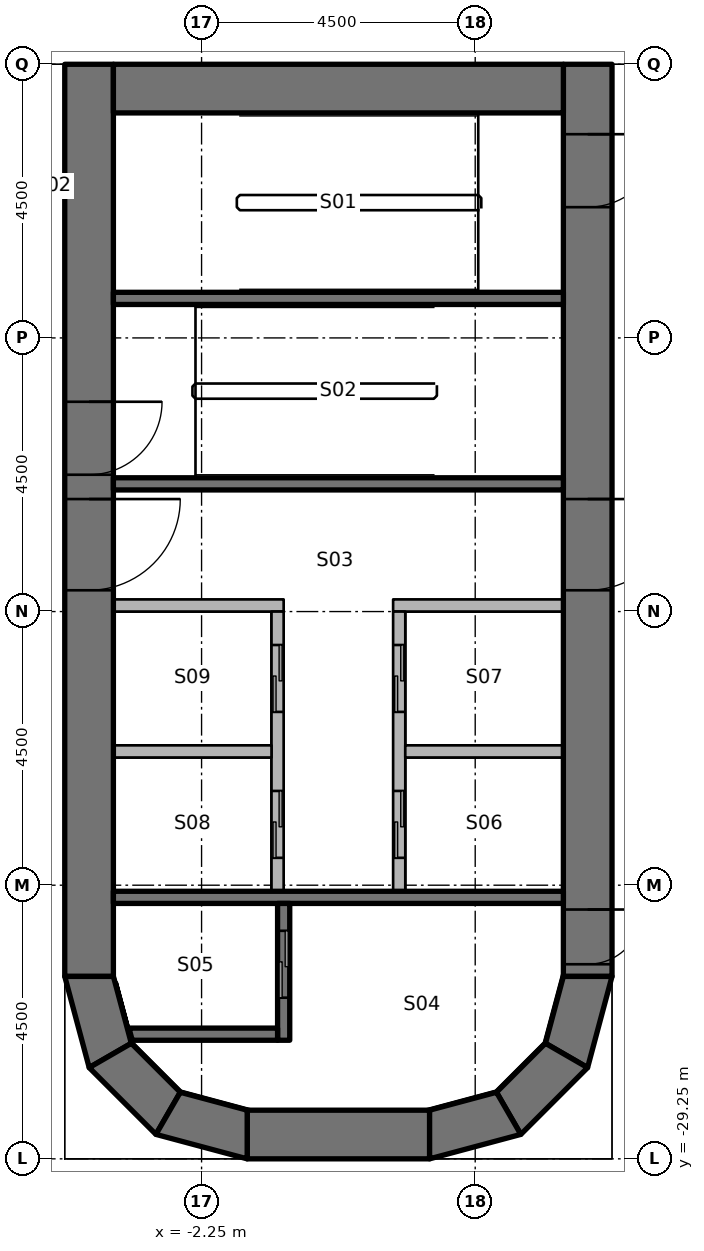
"""IFC4 building model, lengths in metres.
Left out: names, types, materials, properties, quantities, classifications, styles, units other than length and angle.
Written with IfcOpenShell. Run it as: python <this file> out.ifc"""

import sys

from ifc_helpers import new_model, si_unit, direction, frame, frame_2d, origin, place, context, subcontext, project, spatial, polyline, rectangle, outline, extrude, element, fill, save


model = new_model("IFC4")
c1 = context("Model", 3, precision=1e-05, world=origin(), true_north=direction((0.0, 1.0)))
c2 = subcontext(c1, "Body", "Model", "MODEL_VIEW")
j1 = project(units=[si_unit("LENGTHUNIT", "METRE"), si_unit("PLANEANGLEUNIT", "RADIAN")], contexts=[c1])
p1 = place(None, origin())
s1 = spatial("IfcSite", under=j1, at=p1, CompositionType="ELEMENT")
p2 = place(p1, origin())
s2 = spatial("IfcBuilding", under=s1, at=p2, CompositionType="ELEMENT")
p3 = place(p2, frame((0.0, 0.0, 136.0)))
s3 = spatial("IfcBuildingStorey", under=s2, at=p3, CompositionType="ELEMENT", Elevation=136.0)
p4 = place(p3, frame((-4.1, -11.25, 0.0), z_axis=(0.0, 0.0, 1.0), x_axis=(0.0, -1.0, 0.0)))
e1 = element("IfcWall", 1, at=p4, inside=s3, PredefinedType="SHEAR", context=c2, shape_type="SweptSolid", body=[
    extrude(rectangle(XDim=15.0, YDim=0.8, at=frame_2d((7.5, 0.0))), origin(), (0.0, 0.0, 1.0), 5.0),
])
p5 = place(p4, frame((7.15, 0.0, 0.0)))
e2 = element("IfcOpeningElement", 2, at=p5, cuts=e1, PredefinedType="OPENING", context=c2, shape_type="SweptSolid", body=[
    extrude(rectangle(XDim=1.5, YDim=2.3, at=frame_2d((0.75, 1.15))), frame((0.0, 0.41, 0.0), z_axis=(0.0, -1.0, 0.0), x_axis=(1.0, 0.0, 0.0)), (0.0, 0.0, 1.0), 0.82),
])
p6 = place(p4, frame((5.55, 0.0, 0.0)))
e3 = element("IfcOpeningElement", 3, at=p6, cuts=e1, PredefinedType="OPENING", context=c2, shape_type="SweptSolid", body=[
    extrude(rectangle(XDim=1.2, YDim=2.1, at=frame_2d((0.6, 1.05))), frame((0.0, 0.41, 0.0), z_axis=(0.0, -1.0, 0.0), x_axis=(1.0, 0.0, 0.0)), (0.0, 0.0, 1.0), 0.82),
])
p7 = place(p3, frame((4.1, -11.25, 0.0), z_axis=(0.0, 0.0, 1.0), x_axis=(0.0, -1.0, 0.0)))
e4 = element("IfcWall", 4, at=p7, inside=s3, PredefinedType="SHEAR", context=c2, shape_type="SweptSolid", body=[
    extrude(rectangle(XDim=15.0, YDim=0.8, at=frame_2d((7.5, 0.0))), origin(), (0.0, 0.0, 1.0), 5.0),
])
p8 = place(p7, frame((7.15, 0.0, 0.0)))
e5 = element("IfcOpeningElement", 5, at=p8, cuts=e4, PredefinedType="OPENING", context=c2, shape_type="SweptSolid", body=[
    extrude(rectangle(XDim=1.5, YDim=2.3, at=frame_2d((0.75, 1.15))), frame((0.0, 0.41, 0.0), z_axis=(0.0, -1.0, 0.0), x_axis=(1.0, 0.0, 0.0)), (0.0, 0.0, 1.0), 0.82),
])
p9 = place(p7, frame((13.9, 0.0, 0.0)))
e6 = element("IfcOpeningElement", 6, at=p9, cuts=e4, PredefinedType="OPENING", context=c2, shape_type="SweptSolid", body=[
    extrude(rectangle(XDim=0.9, YDim=2.1, at=frame_2d((0.45, 1.05))), frame((0.0, 0.41, 0.0), z_axis=(0.0, -1.0, 0.0), x_axis=(1.0, 0.0, 0.0)), (0.0, 0.0, 1.0), 0.82),
])
p10 = place(p7, frame((1.15, 0.0, 0.0)))
e7 = element("IfcOpeningElement", 7, at=p10, cuts=e4, PredefinedType="OPENING", context=c2, shape_type="SweptSolid", body=[
    extrude(rectangle(XDim=1.2, YDim=2.1, at=frame_2d((0.6, 1.05))), frame((0.0, 0.41, 0.0), z_axis=(0.0, -1.0, 0.0), x_axis=(1.0, 0.0, 0.0)), (0.0, 0.0, 1.0), 0.82),
])
p11 = place(p3, frame((-3.7, -11.65, 0.0), z_axis=(0.0, 0.0, 1.0), x_axis=(1.0, 0.0, 0.0)))
e8 = element("IfcWall", 8, at=p11, inside=s3, PredefinedType="SHEAR", context=c2, shape_type="SweptSolid", body=[
    extrude(rectangle(XDim=7.4, YDim=0.8, at=frame_2d((3.7, 0.0))), origin(), (0.0, 0.0, 1.0), 5.0),
])
p12 = place(p3, frame((-1.5, -28.85, 0.0), z_axis=(0.0, 0.0, 1.0), x_axis=(1.0, 0.0, 0.0)))
e9 = element("IfcWall", 9, at=p12, inside=s3, PredefinedType="SHEAR", context=c2, shape_type="SweptSolid", body=[
    extrude(rectangle(XDim=3.0, YDim=0.8, at=frame_2d((1.5, 0.0))), origin(), (0.0, 0.0, 1.0), 5.0),
])
p13 = place(p3, origin())
e10 = element("IfcWall", 10, at=p13, inside=s3, PredefinedType="SHEAR", context=c2, shape_type="SweptSolid", body=[
    extrude(outline(polyline([(-4.5, -26.25), (-4.098, -27.75), (-3.405, -27.35), (-3.7, -26.25), (-4.5, -26.25)])), origin(), (0.0, 0.0, 1.0), 5.0),
])
p14 = place(p3, origin())
e11 = element("IfcWall", 11, at=p14, inside=s3, PredefinedType="SHEAR", context=c2, shape_type="SweptSolid", body=[
    extrude(outline(polyline([(-4.098, -27.75), (-3.0, -28.848), (-2.6, -28.155), (-3.405, -27.35), (-4.098, -27.75)])), origin(), (0.0, 0.0, 1.0), 5.0),
])
p15 = place(p3, origin())
e12 = element("IfcWall", 12, at=p15, inside=s3, PredefinedType="SHEAR", context=c2, shape_type="SweptSolid", body=[
    extrude(outline(polyline([(-3.0, -28.848), (-1.5, -29.25), (-1.5, -28.45), (-2.6, -28.155), (-3.0, -28.848)])), origin(), (0.0, 0.0, 1.0), 5.0),
])
p16 = place(p3, origin())
e13 = element("IfcWall", 13, at=p16, inside=s3, PredefinedType="SHEAR", context=c2, shape_type="SweptSolid", body=[
    extrude(outline(polyline([(4.5, -26.25), (4.098, -27.75), (3.405, -27.35), (3.7, -26.25), (4.5, -26.25)])), origin(), (0.0, 0.0, 1.0), 5.0),
])
p17 = place(p3, origin())
e14 = element("IfcWall", 14, at=p17, inside=s3, PredefinedType="SHEAR", context=c2, shape_type="SweptSolid", body=[
    extrude(outline(polyline([(4.098, -27.75), (3.0, -28.848), (2.6, -28.155), (3.405, -27.35), (4.098, -27.75)])), origin(), (0.0, 0.0, 1.0), 5.0),
])
p18 = place(p3, origin())
e15 = element("IfcWall", 15, at=p18, inside=s3, PredefinedType="SHEAR", context=c2, shape_type="SweptSolid", body=[
    extrude(outline(polyline([(3.0, -28.848), (1.5, -29.25), (1.5, -28.45), (2.6, -28.155), (3.0, -28.848)])), origin(), (0.0, 0.0, 1.0), 5.0),
])
p19 = place(p3, frame((3.7, -24.95, 0.0), z_axis=(0.0, 0.0, 1.0), x_axis=(-1.0, 0.0, 0.0)))
e16 = element("IfcWall", 16, at=p19, inside=s3, PredefinedType="SHEAR", context=c2, shape_type="SweptSolid", body=[
    extrude(rectangle(XDim=7.4, YDim=0.2, at=frame_2d((3.7, 0.0))), origin(), (0.0, 0.0, 1.0), 4.85),
])
p20 = place(p3, frame((-0.9, -27.3, 0.0), z_axis=(0.0, 0.0, 1.0), x_axis=(0.0, 1.0, 0.0)))
e17 = element("IfcWall", 17, at=p20, inside=s3, PredefinedType="SHEAR", context=c2, shape_type="SweptSolid", body=[
    extrude(rectangle(XDim=2.25, YDim=0.2, at=frame_2d((1.125, 0.0))), origin(), (0.0, 0.0, 1.0), 4.85),
])
p21 = place(p20, frame((0.7, 0.0, 0.0)))
e18 = element("IfcOpeningElement", 18, at=p21, cuts=e17, PredefinedType="OPENING", context=c2, shape_type="SweptSolid", body=[
    extrude(rectangle(XDim=1.1, YDim=2.3, at=frame_2d((0.55, 1.15))), frame((0.0, 0.11, 0.0), z_axis=(0.0, -1.0, 0.0), x_axis=(1.0, 0.0, 0.0)), (0.0, 0.0, 1.0), 0.22),
])
p22 = place(p3, origin())
e19 = element("IfcWall", 19, at=p22, inside=s3, PredefinedType="SHEAR", context=c2, shape_type="SweptSolid", body=[
    extrude(outline(polyline([(-1.0, -27.1), (-3.444, -27.1), (-3.39, -27.3), (-1.0, -27.3), (-1.0, -27.1)])), origin(), (0.0, 0.0, 1.0), 4.85),
])
for number, where, z_axis, x_axis in (
    (20, (3.7, -18.15, 0.0), (0.0, 0.0, 1.0), (-1.0, 0.0, 0.0)),
    (21, (3.7, -15.1, 0.0), (0.0, 0.0, 1.0), (-1.0, 0.0, 0.0)),
):
    element("IfcWall", number, at=place(p3, frame(where, z_axis=z_axis, x_axis=x_axis)), inside=s3, PredefinedType="SHEAR", context=c2, shape_type="SweptSolid", body=[
        extrude(rectangle(XDim=7.4, YDim=0.2, at=frame_2d((3.7, 0.0))), origin(), (0.0, 0.0, 1.0), 4.85),
    ])
p23 = place(p3, frame((3.7, -20.15, 0.0), z_axis=(0.0, 0.0, 1.0), x_axis=(-1.0, 0.0, 0.0)))
e22 = element("IfcWall", 22, at=p23, inside=s3, PredefinedType="PARTITIONING", context=c2, shape_type="SweptSolid", body=[
    extrude(rectangle(XDim=2.8, YDim=0.2, at=frame_2d((1.4, 0.0))), origin(), (0.0, 0.0, 1.0), 4.85),
])
p24 = place(p3, frame((1.0, -24.85, 0.0), z_axis=(0.0, 0.0, 1.0), x_axis=(0.0, 1.0, 0.0)))
e23 = element("IfcWall", 23, at=p24, inside=s3, PredefinedType="PARTITIONING", context=c2, shape_type="SweptSolid", body=[
    extrude(rectangle(XDim=4.6, YDim=0.2, at=frame_2d((2.3, 0.0))), origin(), (0.0, 0.0, 1.0), 4.85),
])
p25 = place(p24, frame((0.55, 0.0, 0.0)))
e24 = element("IfcOpeningElement", 24, at=p25, cuts=e23, PredefinedType="OPENING", context=c2, shape_type="SweptSolid", body=[
    extrude(rectangle(XDim=1.1, YDim=2.3, at=frame_2d((0.55, 1.15))), frame((0.0, 0.11, 0.0), z_axis=(0.0, -1.0, 0.0), x_axis=(1.0, 0.0, 0.0)), (0.0, 0.0, 1.0), 0.22),
])
p26 = place(p24, frame((2.95, 0.0, 0.0)))
e25 = element("IfcOpeningElement", 25, at=p26, cuts=e23, PredefinedType="OPENING", context=c2, shape_type="SweptSolid", body=[
    extrude(rectangle(XDim=1.1, YDim=2.3, at=frame_2d((0.55, 1.15))), frame((0.0, 0.11, 0.0), z_axis=(0.0, -1.0, 0.0), x_axis=(1.0, 0.0, 0.0)), (0.0, 0.0, 1.0), 0.22),
])
p27 = place(p3, frame((-0.9, -20.15, 0.0), z_axis=(0.0, 0.0, 1.0), x_axis=(-1.0, 0.0, 0.0)))
e26 = element("IfcWall", 26, at=p27, inside=s3, PredefinedType="PARTITIONING", context=c2, shape_type="SweptSolid", body=[
    extrude(rectangle(XDim=2.8, YDim=0.2, at=frame_2d((1.4, 0.0))), origin(), (0.0, 0.0, 1.0), 4.85),
])
p28 = place(p3, frame((-1.0, -24.85, 0.0), z_axis=(0.0, 0.0, 1.0), x_axis=(0.0, 1.0, 0.0)))
e27 = element("IfcWall", 27, at=p28, inside=s3, PredefinedType="PARTITIONING", context=c2, shape_type="SweptSolid", body=[
    extrude(rectangle(XDim=4.6, YDim=0.2, at=frame_2d((2.3, 0.0))), origin(), (0.0, 0.0, 1.0), 4.85),
])
p29 = place(p28, frame((0.55, 0.0, 0.0)))
e28 = element("IfcOpeningElement", 28, at=p29, cuts=e27, PredefinedType="OPENING", context=c2, shape_type="SweptSolid", body=[
    extrude(rectangle(XDim=1.1, YDim=2.3, at=frame_2d((0.55, 1.15))), frame((0.0, 0.11, 0.0), z_axis=(0.0, -1.0, 0.0), x_axis=(1.0, 0.0, 0.0)), (0.0, 0.0, 1.0), 0.22),
])
p30 = place(p28, frame((2.95, 0.0, 0.0)))
e29 = element("IfcOpeningElement", 29, at=p30, cuts=e27, PredefinedType="OPENING", context=c2, shape_type="SweptSolid", body=[
    extrude(rectangle(XDim=1.1, YDim=2.3, at=frame_2d((0.55, 1.15))), frame((0.0, 0.11, 0.0), z_axis=(0.0, -1.0, 0.0), x_axis=(1.0, 0.0, 0.0)), (0.0, 0.0, 1.0), 0.22),
])
for number, where, z_axis, x_axis in (
    (30, (3.7, -22.55, 0.0), (0.0, 0.0, 1.0), (-1.0, 0.0, 0.0)),
    (31, (-1.1, -22.55, 0.0), (0.0, 0.0, 1.0), (-1.0, 0.0, 0.0)),
):
    element("IfcWall", number, at=place(p3, frame(where, z_axis=z_axis, x_axis=x_axis)), inside=s3, PredefinedType="PARTITIONING", context=c2, shape_type="SweptSolid", body=[
        extrude(rectangle(XDim=2.6, YDim=0.2, at=frame_2d((1.3, 0.0))), origin(), (0.0, 0.0, 1.0), 4.85),
    ])
p31 = place(p8, origin())
e32 = element("IfcDoor", 32, at=p31, inside=s3, OperationType="DOUBLE_DOOR_SINGLE_SWING", PredefinedType="DOOR", context=c2, shape_type="SweptSolid", body=[
    extrude(rectangle(XDim=1.5, YDim=2.3, at=frame_2d((0.75, 1.15))), frame((0.0, 0.025, 0.0), z_axis=(0.0, -1.0, 0.0), x_axis=(1.0, 0.0, 0.0)), (0.0, 0.0, 1.0), 0.05),
])
fill(e5, e32)
p32 = place(p5, origin())
e33 = element("IfcDoor", 33, at=p32, inside=s3, OperationType="DOUBLE_DOOR_SINGLE_SWING", PredefinedType="DOOR", context=c2, shape_type="SweptSolid", body=[
    extrude(rectangle(XDim=1.5, YDim=2.3, at=frame_2d((0.75, 1.15))), frame((0.0, 0.025, 0.0), z_axis=(0.0, -1.0, 0.0), x_axis=(1.0, 0.0, 0.0)), (0.0, 0.0, 1.0), 0.05),
])
fill(e2, e33)
p33 = place(p9, origin())
e34 = element("IfcDoor", 34, at=p33, inside=s3, OperationType="SINGLE_SWING_LEFT", PredefinedType="DOOR", context=c2, shape_type="SweptSolid", body=[
    extrude(rectangle(XDim=0.9, YDim=2.1, at=frame_2d((0.45, 1.05))), frame((0.0, 0.025, 0.0), z_axis=(0.0, -1.0, 0.0), x_axis=(1.0, 0.0, 0.0)), (0.0, 0.0, 1.0), 0.05),
])
fill(e6, e34)
p34 = place(p6, origin())
e35 = element("IfcDoor", 35, at=p34, inside=s3, OperationType="SINGLE_SWING_LEFT", PredefinedType="DOOR", context=c2, shape_type="SweptSolid", body=[
    extrude(rectangle(XDim=1.2, YDim=2.1, at=frame_2d((0.6, 1.05))), frame((0.0, 0.025, 0.0), z_axis=(0.0, -1.0, 0.0), x_axis=(1.0, 0.0, 0.0)), (0.0, 0.0, 1.0), 0.05),
])
fill(e3, e35)
p35 = place(p10, origin())
e36 = element("IfcDoor", 36, at=p35, inside=s3, OperationType="SINGLE_SWING_RIGHT", PredefinedType="DOOR", context=c2, shape_type="SweptSolid", body=[
    extrude(rectangle(XDim=1.2, YDim=2.1, at=frame_2d((0.6, 1.05))), frame((0.0, 0.025, 0.0), z_axis=(0.0, -1.0, 0.0), x_axis=(1.0, 0.0, 0.0)), (0.0, 0.0, 1.0), 0.05),
])
fill(e7, e36)
p36 = place(p21, origin())
e37 = element("IfcDoor", 37, at=p36, inside=s3, OperationType="DOUBLE_DOOR_SLIDING", PredefinedType="DOOR", context=c2, shape_type="SweptSolid", body=[
    extrude(rectangle(XDim=1.1, YDim=2.3, at=frame_2d((0.55, 1.15))), frame((0.0, 0.025, 0.0), z_axis=(0.0, -1.0, 0.0), x_axis=(1.0, 0.0, 0.0)), (0.0, 0.0, 1.0), 0.05),
])
fill(e18, e37)
p37 = place(p25, origin())
e38 = element("IfcDoor", 38, at=p37, inside=s3, OperationType="DOUBLE_DOOR_SLIDING", PredefinedType="DOOR", context=c2, shape_type="SweptSolid", body=[
    extrude(rectangle(XDim=1.1, YDim=2.3, at=frame_2d((0.55, 1.15))), frame((0.0, 0.025, 0.0), z_axis=(0.0, -1.0, 0.0), x_axis=(1.0, 0.0, 0.0)), (0.0, 0.0, 1.0), 0.05),
])
fill(e24, e38)
p38 = place(p26, origin())
e39 = element("IfcDoor", 39, at=p38, inside=s3, OperationType="DOUBLE_DOOR_SLIDING", PredefinedType="DOOR", context=c2, shape_type="SweptSolid", body=[
    extrude(rectangle(XDim=1.1, YDim=2.3, at=frame_2d((0.55, 1.15))), frame((0.0, 0.025, 0.0), z_axis=(0.0, -1.0, 0.0), x_axis=(1.0, 0.0, 0.0)), (0.0, 0.0, 1.0), 0.05),
])
fill(e25, e39)
p39 = place(p29, origin())
e40 = element("IfcDoor", 40, at=p39, inside=s3, OperationType="DOUBLE_DOOR_SLIDING", PredefinedType="DOOR", context=c2, shape_type="SweptSolid", body=[
    extrude(rectangle(XDim=1.1, YDim=2.3, at=frame_2d((0.55, 1.15))), frame((0.0, 0.025, 0.0), z_axis=(0.0, -1.0, 0.0), x_axis=(1.0, 0.0, 0.0)), (0.0, 0.0, 1.0), 0.05),
])
fill(e28, e40)
p40 = place(p30, origin())
e41 = element("IfcDoor", 41, at=p40, inside=s3, OperationType="DOUBLE_DOOR_SLIDING", PredefinedType="DOOR", context=c2, shape_type="SweptSolid", body=[
    extrude(rectangle(XDim=1.1, YDim=2.3, at=frame_2d((0.55, 1.15))), frame((0.0, 0.025, 0.0), z_axis=(0.0, -1.0, 0.0), x_axis=(1.0, 0.0, 0.0)), (0.0, 0.0, 1.0), 0.05),
])
fill(e29, e41)
save(model, sys.argv[1])
